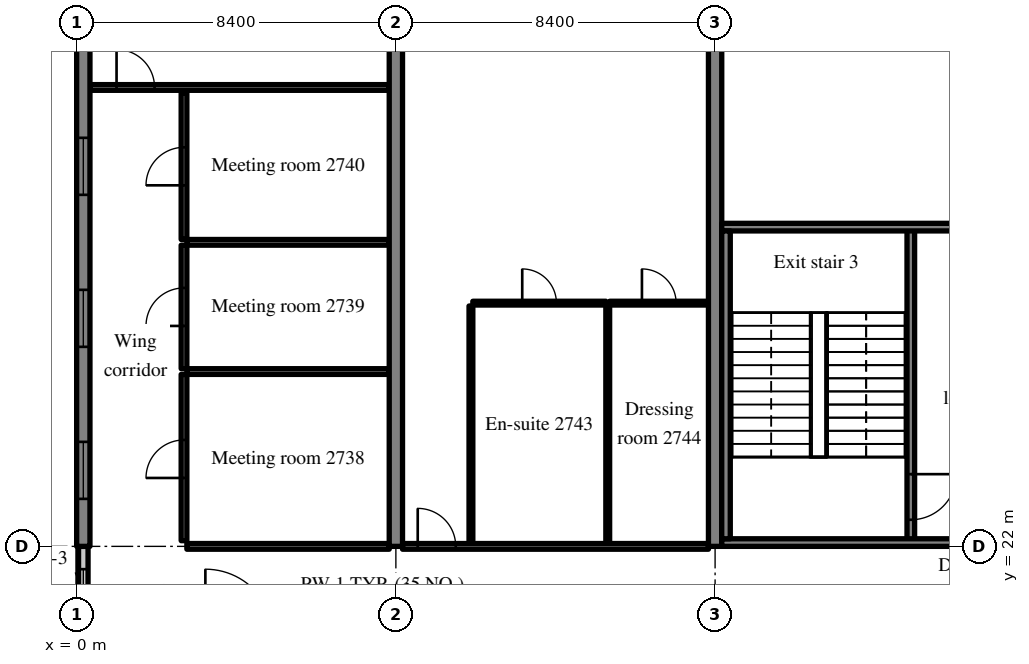
"""IFC4 building model, lengths in metres.
Left out: names, types, materials, properties, quantities, classifications, styles, units other than length and angle.
Written with IfcOpenShell. Run it as: python <this file> out.ifc"""

import sys

from ifc_helpers import new_model, si_unit, direction, frame, frame_2d, origin, place, context, subcontext, project, spatial, rectangle, extrude, source, transform, mapped, element, fill, save


model = new_model("IFC4")
c1 = context("Model", 3, precision=1e-05, world=origin(), true_north=direction((0.0, 1.0)))
c2 = subcontext(c1, "Body", "Model", "MODEL_VIEW")
j1 = project(units=[si_unit("LENGTHUNIT", "METRE"), si_unit("PLANEANGLEUNIT", "RADIAN")], contexts=[c1])
p1 = place(None, origin())
s1 = spatial("IfcSite", under=j1, at=p1, CompositionType="ELEMENT")
p2 = place(p1, origin())
s2 = spatial("IfcBuilding", under=s1, at=p2, CompositionType="ELEMENT")
p3 = place(p2, frame((0.0, 0.0, 114.2)))
s3 = spatial("IfcBuildingStorey", under=s2, at=p3, CompositionType="ELEMENT", Elevation=114.2)
m1 = source(origin(), c2, "Body", "SweptSolid", [
    extrude(rectangle(XDim=16.0, YDim=0.35, at=frame_2d((8.0, 0.0))), origin(), (0.0, 0.0, 1.0), 3.52),
])
p4 = place(p3, frame((0.175, 22.0, 0.0), z_axis=(0.0, 0.0, 1.0), x_axis=(0.0, 1.0, 0.0)))
e1 = element("IfcWall", 1, at=p4, inside=s3, PredefinedType="SHEAR", context=c2, shape_type="MappedRepresentation", body=[
    mapped(m1, transform((0.0, 0.0, 0.0), scale=1.0)),
])
m2 = source(origin(), c2, "Body", "SweptSolid", [
    extrude(rectangle(XDim=1.5, YDim=1.5, at=frame_2d((0.75, 0.75))), frame((0.0, 0.185, 0.0), z_axis=(0.0, -1.0, 0.0), x_axis=(1.0, 0.0, 0.0)), (0.0, 0.0, 1.0), 0.37),
])
p5 = place(p4, frame((1.25, 0.0, 0.9)))
e2 = element("IfcOpeningElement", 2, at=p5, cuts=e1, PredefinedType="OPENING", context=c2, shape_type="MappedRepresentation", body=[
    mapped(m2, transform((0.0, 0.0, 0.0), scale=1.0)),
])
p6 = place(p4, frame((5.25, 0.0, 0.9)))
e3 = element("IfcOpeningElement", 3, at=p6, cuts=e1, PredefinedType="OPENING", context=c2, shape_type="MappedRepresentation", body=[
    mapped(m2, transform((0.0, 0.0, 0.0), scale=1.0)),
])
p7 = place(p4, frame((9.25, 0.0, 0.9)))
e4 = element("IfcOpeningElement", 4, at=p7, cuts=e1, PredefinedType="OPENING", context=c2, shape_type="MappedRepresentation", body=[
    mapped(m2, transform((0.0, 0.0, 0.0), scale=1.0)),
])
p8 = place(p4, frame((13.25, 0.0, 0.9)))
e5 = element("IfcOpeningElement", 5, at=p8, cuts=e1, PredefinedType="OPENING", context=c2, shape_type="MappedRepresentation", body=[
    mapped(m2, transform((0.0, 0.0, 0.0), scale=1.0)),
])
m3 = source(origin(), c2, "Body", "SweptSolid", [
    extrude(rectangle(XDim=20.0, YDim=0.35, at=frame_2d((10.0, 0.0))), origin(), (0.0, 0.0, 1.0), 3.52),
])
for number, where, z_axis, x_axis in (
    (6, (8.4, 22.0, 0.0), (0.0, 0.0, 1.0), (0.0, 1.0, 0.0)),
    (7, (16.8, 22.0, 0.0), (0.0, 0.0, 1.0), (0.0, 1.0, 0.0)),
):
    element("IfcWall", number, at=place(p3, frame(where, z_axis=z_axis, x_axis=x_axis)), inside=s3, PredefinedType="SHEAR", context=c2, shape_type="MappedRepresentation", body=[
        mapped(m3, transform((0.0, 0.0, 0.0), scale=1.0)),
    ])
m4 = source(origin(), c2, "Body", "SweptSolid", [
    extrude(rectangle(XDim=2.4, YDim=0.25, at=frame_2d((1.2, 0.0))), origin(), (0.0, 0.0, 1.0), 2.62),
])
p9 = place(p3, frame((0.175, 19.6, 0.0), z_axis=(0.0, 0.0, 1.0), x_axis=(0.0, 1.0, 0.0)))
e8 = element("IfcWall", 8, at=p9, inside=s3, PredefinedType="SOLIDWALL", context=c2, shape_type="MappedRepresentation", body=[
    mapped(m4, transform((0.0, 0.0, 0.0), scale=1.0)),
])
m5 = source(origin(), c2, "Body", "SweptSolid", [
    extrude(rectangle(XDim=1.2, YDim=1.5, at=frame_2d((0.6, 0.75))), frame((0.0, 0.135, 0.0), z_axis=(0.0, -1.0, 0.0), x_axis=(1.0, 0.0, 0.0)), (0.0, 0.0, 1.0), 0.27),
])
p10 = place(p9, frame((0.6, 0.0, 0.9)))
e9 = element("IfcOpeningElement", 9, at=p10, cuts=e8, PredefinedType="OPENING", context=c2, shape_type="MappedRepresentation", body=[
    mapped(m5, transform((0.0, 0.0, 0.0), scale=1.0)),
])
m6 = source(origin(), c2, "Body", "SweptSolid", [
    extrude(rectangle(XDim=8.3, YDim=0.2, at=frame_2d((4.15, 0.0))), origin(), (0.0, 0.0, 1.0), 3.52),
])
p11 = place(p3, frame((21.95, 22.1, 0.0), z_axis=(0.0, 0.0, 1.0), x_axis=(0.0, 1.0, 0.0)))
e10 = element("IfcWall", 10, at=p11, inside=s3, PredefinedType="SOLIDWALL", context=c2, shape_type="MappedRepresentation", body=[
    mapped(m6, transform((0.0, 0.0, 0.0), scale=1.0)),
])
m7 = source(origin(), c2, "Body", "SweptSolid", [
    extrude(rectangle(XDim=1.2, YDim=2.1, at=frame_2d((0.6, 1.05))), frame((0.0, 0.11, 0.0), z_axis=(0.0, -1.0, 0.0), x_axis=(1.0, 0.0, 0.0)), (0.0, 0.0, 1.0), 0.22),
])
p12 = place(p11, frame((0.6, 0.0, 0.0)))
e11 = element("IfcOpeningElement", 11, at=p12, cuts=e10, PredefinedType="OPENING", context=c2, shape_type="MappedRepresentation", body=[
    mapped(m7, transform((0.0, 0.0, 0.0), scale=1.0)),
])
m8 = source(origin(), c2, "Body", "SweptSolid", [
    extrude(rectangle(XDim=8.225, YDim=0.2, at=frame_2d((4.112, 0.0))), origin(), (0.0, 0.0, 1.0), 3.52),
])
p13 = place(p3, frame((16.975, 22.1, 0.0), z_axis=(0.0, 0.0, 1.0), x_axis=(1.0, 0.0, 0.0)))
e12 = element("IfcWall", 12, at=p13, inside=s3, PredefinedType="SOLIDWALL", context=c2, shape_type="MappedRepresentation", body=[
    mapped(m8, transform((0.0, 0.0, 0.0), scale=1.0)),
])
p14 = place(p13, frame((6.025, 0.0, 0.0)))
e13 = element("IfcOpeningElement", 13, at=p14, cuts=e12, PredefinedType="OPENING", context=c2, shape_type="MappedRepresentation", body=[
    mapped(m7, transform((0.0, 0.0, 0.0), scale=1.0)),
])
p15 = place(p3, frame((16.975, 30.4, 0.0), z_axis=(0.0, 0.0, 1.0), x_axis=(1.0, 0.0, 0.0)))
e14 = element("IfcWall", 14, at=p15, inside=s3, PredefinedType="SOLIDWALL", context=c2, shape_type="MappedRepresentation", body=[
    mapped(m8, transform((0.0, 0.0, 0.0), scale=1.0)),
])
m9 = source(origin(), c2, "Body", "SweptSolid", [
    extrude(rectangle(XDim=1.0, YDim=2.1, at=frame_2d((0.5, 1.05))), frame((0.0, 0.11, 0.0), z_axis=(0.0, -1.0, 0.0), x_axis=(1.0, 0.0, 0.0)), (0.0, 0.0, 1.0), 0.22),
])
p16 = place(p15, frame((6.125, 0.0, 0.0)))
e15 = element("IfcOpeningElement", 15, at=p16, cuts=e14, PredefinedType="OPENING", context=c2, shape_type="MappedRepresentation", body=[
    mapped(m9, transform((0.0, 0.0, 0.0), scale=1.0)),
])
m10 = source(origin(), c2, "Body", "SweptSolid", [
    extrude(rectangle(XDim=8.1, YDim=0.225, at=frame_2d((4.05, 0.0))), origin(), (0.0, 0.0, 1.0), 3.52),
])
p17 = place(p3, frame((17.087, 22.2, 0.0), z_axis=(0.0, 0.0, 1.0), x_axis=(0.0, 1.0, 0.0)))
e16 = element("IfcWall", 16, at=p17, inside=s3, PredefinedType="SOLIDWALL", context=c2, shape_type="MappedRepresentation", body=[
    mapped(m10, transform((0.0, 0.0, 0.0), scale=1.0)),
])
m11 = source(origin(), c2, "Body", "SweptSolid", [
    extrude(rectangle(XDim=5.325, YDim=0.15, at=frame_2d((2.663, 0.0))), origin(), (0.0, 0.0, 1.0), 2.82),
])
p18 = place(p3, frame((2.9, 22.0, 0.0), z_axis=(0.0, 0.0, 1.0), x_axis=(1.0, 0.0, 0.0)))
e17 = element("IfcWall", 17, at=p18, inside=s3, PredefinedType="PARTITIONING", context=c2, shape_type="MappedRepresentation", body=[
    mapped(m11, transform((0.0, 0.0, 0.0), scale=1.0)),
])
m12 = source(origin(), c2, "Body", "SweptSolid", [
    extrude(rectangle(XDim=4.375, YDim=0.15, at=frame_2d((2.188, 0.0))), origin(), (0.0, 0.0, 1.0), 3.52),
])
p19 = place(p3, frame((2.825, 22.15, 0.0), z_axis=(0.0, 0.0, 1.0), x_axis=(0.0, 1.0, 0.0)))
e18 = element("IfcWall", 18, at=p19, inside=s3, PredefinedType="PARTITIONING", context=c2, shape_type="MappedRepresentation", body=[
    mapped(m12, transform((0.0, 0.0, 0.0), scale=1.0)),
])
m13 = source(origin(), c2, "Body", "SweptSolid", [
    extrude(rectangle(XDim=1.0, YDim=2.1, at=frame_2d((0.5, 1.05))), frame((0.0, 0.085, 0.0), z_axis=(0.0, -1.0, 0.0), x_axis=(1.0, 0.0, 0.0)), (0.0, 0.0, 1.0), 0.17),
])
p20 = place(p19, frame((1.65, 0.0, 0.0)))
e19 = element("IfcOpeningElement", 19, at=p20, cuts=e18, PredefinedType="OPENING", context=c2, shape_type="MappedRepresentation", body=[
    mapped(m13, transform((0.0, 0.0, 0.0), scale=1.0)),
])
m14 = source(origin(), c2, "Body", "SweptSolid", [
    extrude(rectangle(XDim=5.325, YDim=0.15, at=frame_2d((2.663, 0.0))), origin(), (0.0, 0.0, 1.0), 3.52),
])
p21 = place(p3, frame((2.9, 26.6, 0.0), z_axis=(0.0, 0.0, 1.0), x_axis=(1.0, 0.0, 0.0)))
e20 = element("IfcWall", 20, at=p21, inside=s3, PredefinedType="PARTITIONING", context=c2, shape_type="MappedRepresentation", body=[
    mapped(m14, transform((0.0, 0.0, 0.0), scale=1.0)),
])
m15 = source(origin(), c2, "Body", "SweptSolid", [
    extrude(rectangle(XDim=3.25, YDim=0.15, at=frame_2d((1.625, 0.0))), origin(), (0.0, 0.0, 1.0), 3.52),
])
p22 = place(p3, frame((2.825, 26.675, 0.0), z_axis=(0.0, 0.0, 1.0), x_axis=(0.0, 1.0, 0.0)))
e21 = element("IfcWall", 21, at=p22, inside=s3, PredefinedType="PARTITIONING", context=c2, shape_type="MappedRepresentation", body=[
    mapped(m15, transform((0.0, 0.0, 0.0), scale=1.0)),
])
p23 = place(p22, frame((1.125, 0.0, 0.0)))
e22 = element("IfcOpeningElement", 22, at=p23, cuts=e21, PredefinedType="OPENING", context=c2, shape_type="MappedRepresentation", body=[
    mapped(m13, transform((0.0, 0.0, 0.0), scale=1.0)),
])
p24 = place(p3, frame((2.9, 30.0, 0.0), z_axis=(0.0, 0.0, 1.0), x_axis=(1.0, 0.0, 0.0)))
e23 = element("IfcWall", 23, at=p24, inside=s3, PredefinedType="PARTITIONING", context=c2, shape_type="MappedRepresentation", body=[
    mapped(m14, transform((0.0, 0.0, 0.0), scale=1.0)),
])
m16 = source(origin(), c2, "Body", "SweptSolid", [
    extrude(rectangle(XDim=3.85, YDim=0.15, at=frame_2d((1.925, 0.0))), origin(), (0.0, 0.0, 1.0), 3.52),
])
p25 = place(p3, frame((2.825, 30.075, 0.0), z_axis=(0.0, 0.0, 1.0), x_axis=(0.0, 1.0, 0.0)))
e24 = element("IfcWall", 24, at=p25, inside=s3, PredefinedType="PARTITIONING", context=c2, shape_type="MappedRepresentation", body=[
    mapped(m16, transform((0.0, 0.0, 0.0), scale=1.0)),
])
p26 = place(p25, frame((1.425, 0.0, 0.0)))
e25 = element("IfcOpeningElement", 25, at=p26, cuts=e24, PredefinedType="OPENING", context=c2, shape_type="MappedRepresentation", body=[
    mapped(m13, transform((0.0, 0.0, 0.0), scale=1.0)),
])
m17 = source(origin(), c2, "Body", "SweptSolid", [
    extrude(rectangle(XDim=7.875, YDim=0.15, at=frame_2d((3.938, 0.0))), origin(), (0.0, 0.0, 1.0), 3.52),
])
p27 = place(p3, frame((0.35, 34.075, 0.0), z_axis=(0.0, 0.0, 1.0), x_axis=(1.0, 0.0, 0.0)))
e26 = element("IfcWall", 26, at=p27, inside=s3, PredefinedType="PARTITIONING", context=c2, shape_type="MappedRepresentation", body=[
    mapped(m17, transform((0.0, 0.0, 0.0), scale=1.0)),
])
p28 = place(p27, frame((0.7, 0.0, 0.0)))
e27 = element("IfcOpeningElement", 27, at=p28, cuts=e26, PredefinedType="OPENING", context=c2, shape_type="MappedRepresentation", body=[
    mapped(m13, transform((0.0, 0.0, 0.0), scale=1.0)),
])
m18 = source(origin(), c2, "Body", "SweptSolid", [
    extrude(rectangle(XDim=6.25, YDim=0.1, at=frame_2d((3.125, 0.0))), origin(), (0.0, 0.0, 1.0), 3.52),
])
for number, where, z_axis, x_axis in (
    (28, (10.375, 22.075, 0.0), (0.0, 0.0, 1.0), (0.0, 1.0, 0.0)),
    (29, (13.975, 22.075, 0.0), (0.0, 0.0, 1.0), (0.0, 1.0, 0.0)),
):
    element("IfcWall", number, at=place(p3, frame(where, z_axis=z_axis, x_axis=x_axis)), inside=s3, PredefinedType="PARTITIONING", context=c2, shape_type="MappedRepresentation", body=[
        mapped(m18, transform((0.0, 0.0, 0.0), scale=1.0)),
    ])
m19 = source(origin(), c2, "Body", "SweptSolid", [
    extrude(rectangle(XDim=3.5, YDim=0.1, at=frame_2d((1.75, 0.0))), origin(), (0.0, 0.0, 1.0), 3.52),
])
p29 = place(p3, frame((10.425, 28.4, 0.0), z_axis=(0.0, 0.0, 1.0), x_axis=(1.0, 0.0, 0.0)))
e30 = element("IfcWall", 30, at=p29, inside=s3, PredefinedType="PARTITIONING", context=c2, shape_type="MappedRepresentation", body=[
    mapped(m19, transform((0.0, 0.0, 0.0), scale=1.0)),
])
m20 = source(origin(), c2, "Body", "SweptSolid", [
    extrude(rectangle(XDim=0.9, YDim=2.1, at=frame_2d((0.45, 1.05))), frame((0.0, 0.06, 0.0), z_axis=(0.0, -1.0, 0.0), x_axis=(1.0, 0.0, 0.0)), (0.0, 0.0, 1.0), 0.12),
])
p30 = place(p29, frame((1.3, 0.0, 0.0)))
e31 = element("IfcOpeningElement", 31, at=p30, cuts=e30, PredefinedType="OPENING", context=c2, shape_type="MappedRepresentation", body=[
    mapped(m20, transform((0.0, 0.0, 0.0), scale=1.0)),
])
m21 = source(origin(), c2, "Body", "SweptSolid", [
    extrude(rectangle(XDim=2.6, YDim=0.1, at=frame_2d((1.3, 0.0))), origin(), (0.0, 0.0, 1.0), 3.52),
])
p31 = place(p3, frame((14.025, 28.4, 0.0), z_axis=(0.0, 0.0, 1.0), x_axis=(1.0, 0.0, 0.0)))
e32 = element("IfcWall", 32, at=p31, inside=s3, PredefinedType="PARTITIONING", context=c2, shape_type="MappedRepresentation", body=[
    mapped(m21, transform((0.0, 0.0, 0.0), scale=1.0)),
])
p32 = place(p31, frame((0.85, 0.0, 0.0)))
e33 = element("IfcOpeningElement", 33, at=p32, cuts=e32, PredefinedType="OPENING", context=c2, shape_type="MappedRepresentation", body=[
    mapped(m20, transform((0.0, 0.0, 0.0), scale=1.0)),
])
m22 = source(origin(), c2, "Body", "SweptSolid", [
    extrude(rectangle(XDim=8.05, YDim=0.15, at=frame_2d((4.025, 0.0))), origin(), (0.0, 0.0, 1.0), 2.82),
])
p33 = place(p3, frame((8.575, 22.0, 0.0), z_axis=(0.0, 0.0, 1.0), x_axis=(1.0, 0.0, 0.0)))
e34 = element("IfcWall", 34, at=p33, inside=s3, PredefinedType="PARTITIONING", context=c2, shape_type="MappedRepresentation", body=[
    mapped(m22, transform((0.0, 0.0, 0.0), scale=1.0)),
])
p34 = place(p33, frame((0.4, 0.0, 0.0)))
e35 = element("IfcOpeningElement", 35, at=p34, cuts=e34, PredefinedType="OPENING", context=c2, shape_type="MappedRepresentation", body=[
    mapped(m13, transform((0.0, 0.0, 0.0), scale=1.0)),
])
m23 = source(origin(), c2, "Body", "SweptSolid", [
    extrude(rectangle(XDim=1.5, YDim=1.5, at=frame_2d((0.75, 0.75))), frame((0.0, 0.03, 0.0), z_axis=(0.0, -1.0, 0.0), x_axis=(1.0, 0.0, 0.0)), (0.0, 0.0, 1.0), 0.06),
])
p35 = place(p5, origin())
e36 = element("IfcWindow", 36, at=p35, inside=s3, PartitioningType="SINGLE_PANEL", PredefinedType="WINDOW", context=c2, shape_type="MappedRepresentation", body=[
    mapped(m23, transform((0.0, 0.0, 0.0), scale=1.0)),
])
fill(e2, e36)
p36 = place(p6, origin())
e37 = element("IfcWindow", 37, at=p36, inside=s3, PartitioningType="SINGLE_PANEL", PredefinedType="WINDOW", context=c2, shape_type="MappedRepresentation", body=[
    mapped(m23, transform((0.0, 0.0, 0.0), scale=1.0)),
])
fill(e3, e37)
p37 = place(p7, origin())
e38 = element("IfcWindow", 38, at=p37, inside=s3, PartitioningType="SINGLE_PANEL", PredefinedType="WINDOW", context=c2, shape_type="MappedRepresentation", body=[
    mapped(m23, transform((0.0, 0.0, 0.0), scale=1.0)),
])
fill(e4, e38)
m24 = source(origin(), c2, "Body", "SweptSolid", [
    extrude(rectangle(XDim=1.2, YDim=1.5, at=frame_2d((0.6, 0.75))), frame((0.0, 0.03, 0.0), z_axis=(0.0, -1.0, 0.0), x_axis=(1.0, 0.0, 0.0)), (0.0, 0.0, 1.0), 0.06),
])
p38 = place(p10, origin())
e39 = element("IfcWindow", 39, at=p38, inside=s3, PartitioningType="SINGLE_PANEL", PredefinedType="WINDOW", context=c2, shape_type="MappedRepresentation", body=[
    mapped(m24, transform((0.0, 0.0, 0.0), scale=1.0)),
])
fill(e9, e39)
m25 = source(origin(), c2, "Body", "SweptSolid", [
    extrude(rectangle(XDim=1.2, YDim=2.1, at=frame_2d((0.6, 1.05))), frame((0.0, 0.025, 0.0), z_axis=(0.0, -1.0, 0.0), x_axis=(1.0, 0.0, 0.0)), (0.0, 0.0, 1.0), 0.05),
])
p39 = place(p12, origin())
e40 = element("IfcDoor", 40, at=p39, inside=s3, OperationType="SINGLE_SWING_RIGHT", PredefinedType="DOOR", context=c2, shape_type="MappedRepresentation", body=[
    mapped(m25, transform((0.0, 0.0, 0.0), scale=1.0)),
])
fill(e11, e40)
m26 = source(origin(), c2, "Body", "SweptSolid", [
    extrude(rectangle(XDim=1.0, YDim=2.1, at=frame_2d((0.5, 1.05))), frame((0.0, 0.025, 0.0), z_axis=(0.0, -1.0, 0.0), x_axis=(1.0, 0.0, 0.0)), (0.0, 0.0, 1.0), 0.05),
])
p40 = place(p20, origin())
e41 = element("IfcDoor", 41, at=p40, inside=s3, OperationType="SINGLE_SWING_LEFT", PredefinedType="DOOR", context=c2, shape_type="MappedRepresentation", body=[
    mapped(m26, transform((0.0, 0.0, 0.0), scale=1.0)),
])
fill(e19, e41)
p41 = place(p23, origin())
e42 = element("IfcDoor", 42, at=p41, inside=s3, OperationType="SINGLE_SWING_LEFT", PredefinedType="DOOR", context=c2, shape_type="MappedRepresentation", body=[
    mapped(m26, transform((0.0, 0.0, 0.0), scale=1.0)),
])
fill(e22, e42)
p42 = place(p26, origin())
e43 = element("IfcDoor", 43, at=p42, inside=s3, OperationType="SINGLE_SWING_LEFT", PredefinedType="DOOR", context=c2, shape_type="MappedRepresentation", body=[
    mapped(m26, transform((0.0, 0.0, 0.0), scale=1.0)),
])
fill(e25, e43)
p43 = place(p28, origin())
e44 = element("IfcDoor", 44, at=p43, inside=s3, OperationType="SINGLE_SWING_LEFT", PredefinedType="DOOR", context=c2, shape_type="MappedRepresentation", body=[
    mapped(m26, transform((0.0, 0.0, 0.0), scale=1.0)),
])
fill(e27, e44)
m27 = source(origin(), c2, "Body", "SweptSolid", [
    extrude(rectangle(XDim=0.9, YDim=2.1, at=frame_2d((0.45, 1.05))), frame((0.0, 0.025, 0.0), z_axis=(0.0, -1.0, 0.0), x_axis=(1.0, 0.0, 0.0)), (0.0, 0.0, 1.0), 0.05),
])
p44 = place(p30, origin())
e45 = element("IfcDoor", 45, at=p44, inside=s3, OperationType="SINGLE_SWING_LEFT", PredefinedType="DOOR", context=c2, shape_type="MappedRepresentation", body=[
    mapped(m27, transform((0.0, 0.0, 0.0), scale=1.0)),
])
fill(e31, e45)
p45 = place(p32, origin())
e46 = element("IfcDoor", 46, at=p45, inside=s3, OperationType="SINGLE_SWING_LEFT", PredefinedType="DOOR", context=c2, shape_type="MappedRepresentation", body=[
    mapped(m27, transform((0.0, 0.0, 0.0), scale=1.0)),
])
fill(e33, e46)
p46 = place(p34, origin())
e47 = element("IfcDoor", 47, at=p46, inside=s3, OperationType="SINGLE_SWING_LEFT", PredefinedType="DOOR", context=c2, shape_type="MappedRepresentation", body=[
    mapped(m26, transform((0.0, 0.0, 0.0), scale=1.0)),
])
fill(e35, e47)
save(model, sys.argv[1])
